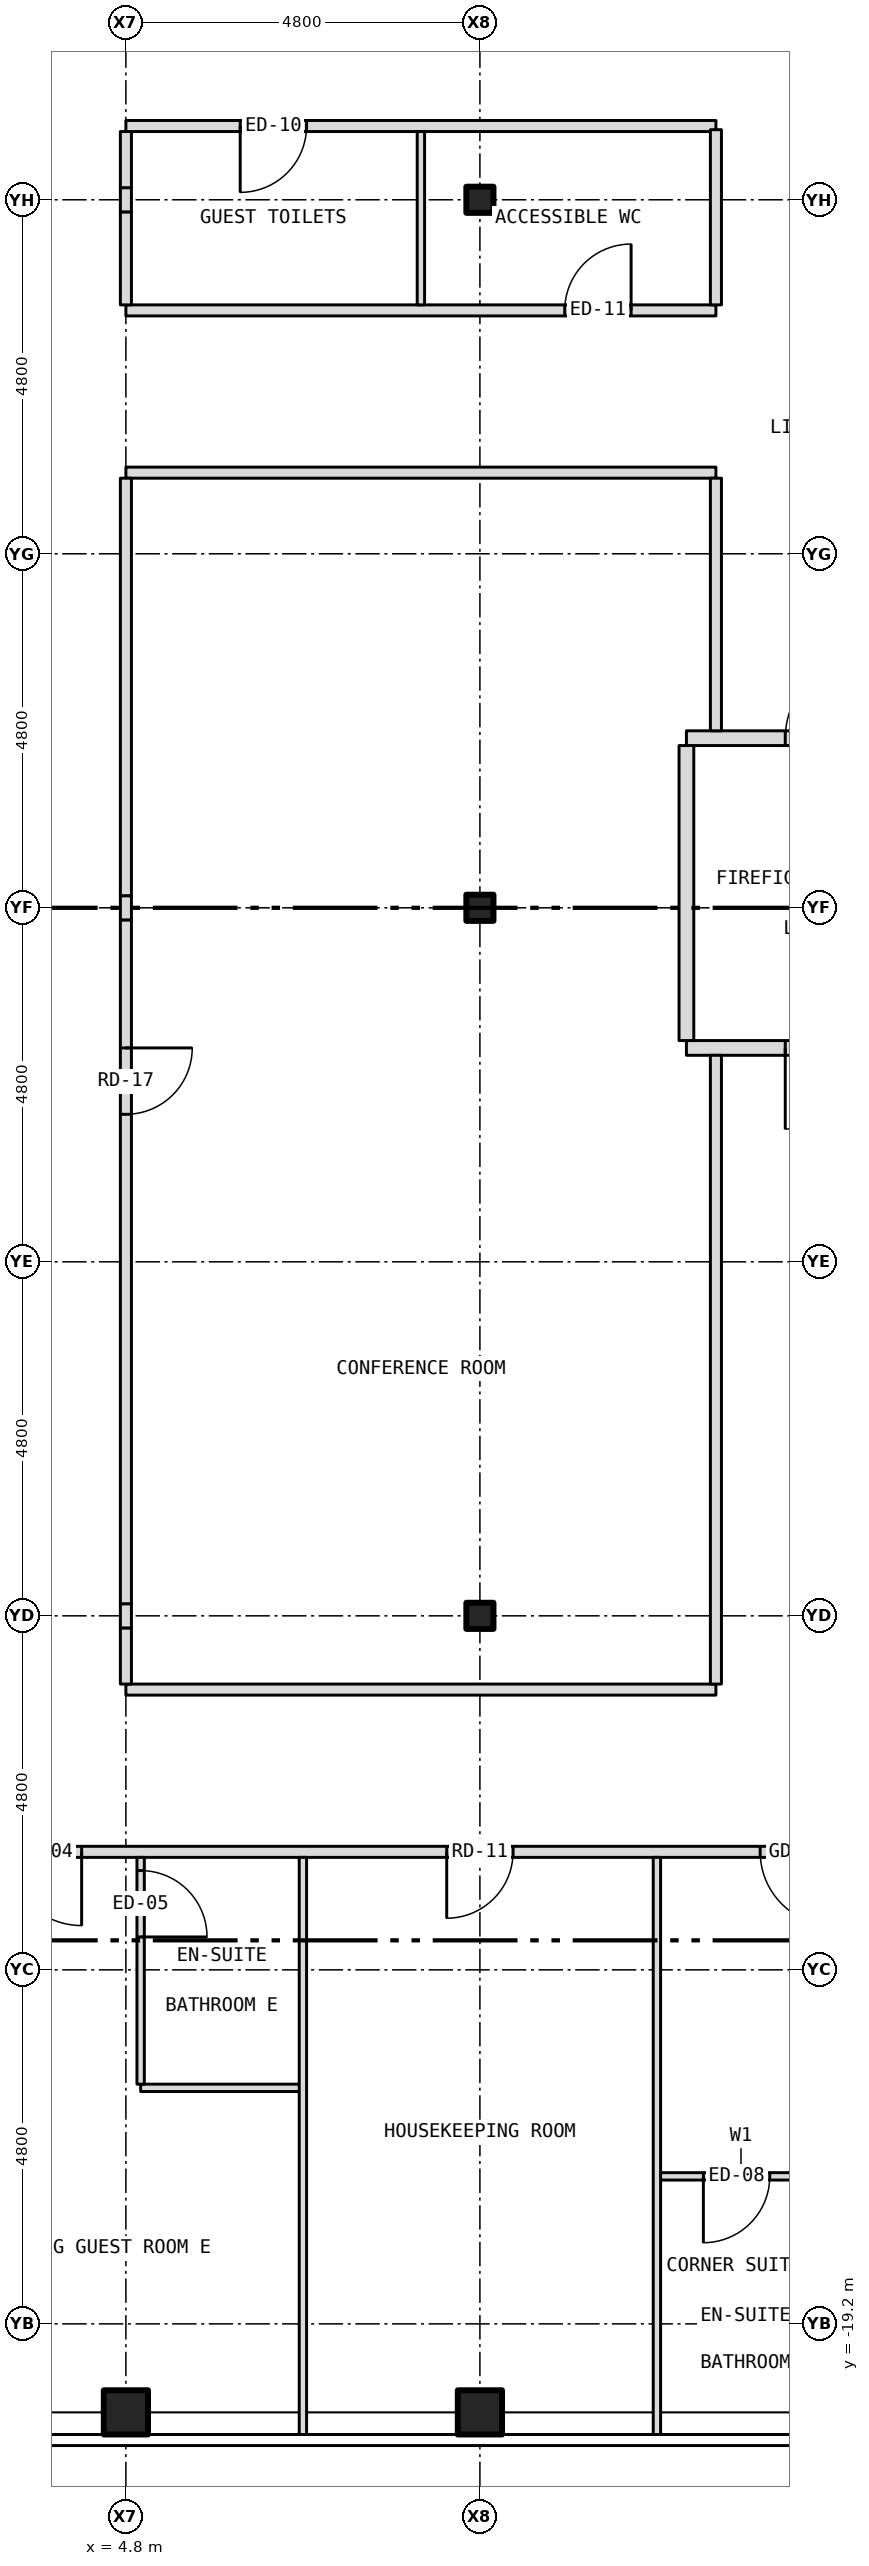
"""IFC4 building model, lengths in metres.
Left out: names, types, materials, properties, quantities, classifications, styles, units other than length and angle.
Written with IfcOpenShell. Run it as: python <this file> out.ifc"""

import sys

from ifc_helpers import new_model, si_unit, direction, frame, frame_2d, origin, origin_2d, place, context, subcontext, project, spatial, rectangle, hollow_rectangle, i_section, extrude, element, fill, save


model = new_model("IFC4")
c1 = context("Model", 3, precision=1e-05, world=origin(), true_north=direction((0.0, 1.0)))
c2 = subcontext(c1, "Body", "Model", "MODEL_VIEW")
j1 = project(units=[si_unit("LENGTHUNIT", "METRE"), si_unit("PLANEANGLEUNIT", "RADIAN")], contexts=[c1])
p1 = place(None, origin())
s1 = spatial("IfcSite", under=j1, at=p1, CompositionType="ELEMENT")
p2 = place(p1, origin())
s2 = spatial("IfcBuilding", under=s1, at=p2, CompositionType="ELEMENT")
p3 = place(p2, frame((0.0, 0.0, 251.5)))
s3 = spatial("IfcBuildingStorey", under=s2, at=p3, CompositionType="ELEMENT", Elevation=251.5)
for number, where, z_axis, x_axis in (
    (1, (4.8, -20.4, -0.15), (0.0, 0.0, 1.0), (1.0, 0.0, 0.0)),
    (2, (9.6, -20.4, -0.15), (0.0, 0.0, 1.0), (1.0, 0.0, 0.0)),
):
    element("IfcColumn", number, at=place(p3, frame(where, z_axis=z_axis, x_axis=x_axis)), inside=s3, PredefinedType="COLUMN", context=c2, shape_type="SweptSolid", body=[
        extrude(hollow_rectangle(XDim=0.6, YDim=0.6, WallThickness=0.03, at=origin_2d()), origin(), (0.0, 0.0, 1.0), 3.5),
    ])
for number, where, z_axis, x_axis in (
    (3, (9.6, -9.6, -0.15), (0.0, 0.0, 1.0), (1.0, 0.0, 0.0)),
    (4, (9.6, 0.0, -0.15), (0.0, 0.0, 1.0), (1.0, 0.0, 0.0)),
    (5, (9.6, 9.6, -0.15), (0.0, 0.0, 1.0), (1.0, 0.0, 0.0)),
):
    element("IfcColumn", number, at=place(p3, frame(where, z_axis=z_axis, x_axis=x_axis)), inside=s3, PredefinedType="COLUMN", context=c2, shape_type="SweptSolid", body=[
        extrude(i_section(OverallWidth=0.368, OverallDepth=0.356, WebThickness=0.011, FlangeThickness=0.018, at=origin_2d()), origin(), (0.0, 0.0, 1.0), 3.5),
    ])
p4 = place(p3, frame((12.0, -17.2, 0.0), z_axis=(0.0, 0.0, 1.0), x_axis=(1.0, 0.0, 0.0)))
e6 = element("IfcWall", 6, at=p4, inside=s3, PredefinedType="PARTITIONING", context=c2, shape_type="SweptSolid", body=[
    extrude(rectangle(XDim=2.28, YDim=0.1, at=frame_2d((1.14, 0.0))), origin(), (0.0, 0.0, 1.0), 3.35),
])
p5 = place(p4, frame((0.63, 0.0, 0.0)))
e7 = element("IfcOpeningElement", 7, at=p5, cuts=e6, PredefinedType="OPENING", context=c2, shape_type="SweptSolid", body=[
    extrude(rectangle(XDim=0.9, YDim=2.1, at=frame_2d((0.45, 1.05))), frame((0.0, 0.062, 0.0), z_axis=(0.0, -1.0, 0.0), x_axis=(1.0, 0.0, 0.0)), (0.0, 0.0, 1.0), 0.124),
])
p6 = place(p3, frame((5.0, -16.0, 0.0), z_axis=(0.0, 0.0, 1.0), x_axis=(1.0, 0.0, 0.0)))
e8 = element("IfcWall", 8, at=p6, inside=s3, PredefinedType="PARTITIONING", context=c2, shape_type="SweptSolid", body=[
    extrude(rectangle(XDim=2.2, YDim=0.1, at=frame_2d((1.1, 0.0))), origin(), (0.0, 0.0, 1.0), 3.35),
])
p7 = place(p3, frame((-15.8, -12.8, 0.0), z_axis=(0.0, 0.0, 1.0), x_axis=(1.0, 0.0, 0.0)))
e9 = element("IfcWall", 9, at=p7, inside=s3, PredefinedType="PARTITIONING", context=c2, shape_type="SweptSolid", body=[
    extrude(rectangle(XDim=31.6, YDim=0.15, at=frame_2d((15.8, 0.0))), origin(), (0.0, 0.0, 1.0), 3.35),
])
p8 = place(p7, frame((10.55, 0.0, 0.0)))
e10 = element("IfcOpeningElement", 10, at=p8, cuts=e9, PredefinedType="OPENING", context=c2, shape_type="SweptSolid", body=[
    extrude(rectangle(XDim=0.9, YDim=2.1, at=frame_2d((0.45, 1.05))), frame((0.0, 0.087, 0.0), z_axis=(0.0, -1.0, 0.0), x_axis=(1.0, 0.0, 0.0)), (0.0, 0.0, 1.0), 0.174),
])
p9 = place(p7, frame((19.0, 0.0, 0.0)))
e11 = element("IfcOpeningElement", 11, at=p9, cuts=e9, PredefinedType="OPENING", context=c2, shape_type="SweptSolid", body=[
    extrude(rectangle(XDim=1.0, YDim=2.1, at=frame_2d((0.5, 1.05))), frame((0.0, 0.087, 0.0), z_axis=(0.0, -1.0, 0.0), x_axis=(1.0, 0.0, 0.0)), (0.0, 0.0, 1.0), 0.174),
])
p10 = place(p7, frame((24.95, 0.0, 0.0)))
e12 = element("IfcOpeningElement", 12, at=p10, cuts=e9, PredefinedType="OPENING", context=c2, shape_type="SweptSolid", body=[
    extrude(rectangle(XDim=0.9, YDim=2.1, at=frame_2d((0.45, 1.05))), frame((0.0, 0.087, 0.0), z_axis=(0.0, -1.0, 0.0), x_axis=(1.0, 0.0, 0.0)), (0.0, 0.0, 1.0), 0.174),
])
p11 = place(p7, frame((1.4, 0.0, 0.0)))
e13 = element("IfcOpeningElement", 13, at=p11, cuts=e9, PredefinedType="OPENING", context=c2, shape_type="SweptSolid", body=[
    extrude(rectangle(XDim=1.0, YDim=2.1, at=frame_2d((0.5, 1.05))), frame((0.0, 0.087, 0.0), z_axis=(0.0, -1.0, 0.0), x_axis=(1.0, 0.0, 0.0)), (0.0, 0.0, 1.0), 0.174),
])
p12 = place(p7, frame((29.2, 0.0, 0.0)))
e14 = element("IfcOpeningElement", 14, at=p12, cuts=e9, PredefinedType="OPENING", context=c2, shape_type="SweptSolid", body=[
    extrude(rectangle(XDim=1.0, YDim=2.1, at=frame_2d((0.5, 1.05))), frame((0.0, 0.087, 0.0), z_axis=(0.0, -1.0, 0.0), x_axis=(1.0, 0.0, 0.0)), (0.0, 0.0, 1.0), 0.174),
])
p13 = place(p3, frame((4.8, -10.6, 0.0), z_axis=(0.0, 0.0, 1.0), x_axis=(1.0, 0.0, 0.0)))
e15 = element("IfcWall", 15, at=p13, inside=s3, PredefinedType="PARTITIONING", context=c2, shape_type="SweptSolid", body=[
    extrude(rectangle(XDim=8.0, YDim=0.15, at=frame_2d((4.0, 0.0))), origin(), (0.0, 0.0, 1.0), 3.35),
])
p14 = place(p3, frame((12.4, -1.9, 0.0), z_axis=(0.0, 0.0, 1.0), x_axis=(1.0, 0.0, 0.0)))
e16 = element("IfcWall", 16, at=p14, inside=s3, PredefinedType="PARTITIONING", context=c2, shape_type="SweptSolid", body=[
    extrude(rectangle(XDim=3.28, YDim=0.2, at=frame_2d((1.64, 0.0))), origin(), (0.0, 0.0, 1.0), 3.35),
])
p15 = place(p14, frame((1.34, 0.0, 0.0)))
e17 = element("IfcOpeningElement", 17, at=p15, cuts=e16, PredefinedType="OPENING", context=c2, shape_type="SweptSolid", body=[
    extrude(rectangle(XDim=1.1, YDim=2.1, at=frame_2d((0.55, 1.05))), frame((0.0, 0.112, 0.0), z_axis=(0.0, -1.0, 0.0), x_axis=(1.0, 0.0, 0.0)), (0.0, 0.0, 1.0), 0.224),
])
p16 = place(p3, frame((12.4, 2.3, 0.0), z_axis=(0.0, 0.0, 1.0), x_axis=(1.0, 0.0, 0.0)))
e18 = element("IfcWall", 18, at=p16, inside=s3, PredefinedType="PARTITIONING", context=c2, shape_type="SweptSolid", body=[
    extrude(rectangle(XDim=3.28, YDim=0.2, at=frame_2d((1.64, 0.0))), origin(), (0.0, 0.0, 1.0), 3.35),
])
p17 = place(p16, frame((1.34, 0.0, 0.0)))
e19 = element("IfcOpeningElement", 19, at=p17, cuts=e18, PredefinedType="OPENING", context=c2, shape_type="SweptSolid", body=[
    extrude(rectangle(XDim=1.1, YDim=2.1, at=frame_2d((0.55, 1.05))), frame((0.0, 0.112, 0.0), z_axis=(0.0, -1.0, 0.0), x_axis=(1.0, 0.0, 0.0)), (0.0, 0.0, 1.0), 0.224),
])
p18 = place(p3, frame((4.8, 5.9, 0.0), z_axis=(0.0, 0.0, 1.0), x_axis=(1.0, 0.0, 0.0)))
e20 = element("IfcWall", 20, at=p18, inside=s3, PredefinedType="PARTITIONING", context=c2, shape_type="SweptSolid", body=[
    extrude(rectangle(XDim=8.0, YDim=0.15, at=frame_2d((4.0, 0.0))), origin(), (0.0, 0.0, 1.0), 3.35),
])
p19 = place(p3, frame((4.8, 8.1, 0.0), z_axis=(0.0, 0.0, 1.0), x_axis=(1.0, 0.0, 0.0)))
e21 = element("IfcWall", 21, at=p19, inside=s3, PredefinedType="PARTITIONING", context=c2, shape_type="SweptSolid", body=[
    extrude(rectangle(XDim=8.0, YDim=0.15, at=frame_2d((4.0, 0.0))), origin(), (0.0, 0.0, 1.0), 3.35),
])
p20 = place(p19, frame((5.95, 0.0, 0.0)))
e22 = element("IfcOpeningElement", 22, at=p20, cuts=e21, PredefinedType="OPENING", context=c2, shape_type="SweptSolid", body=[
    extrude(rectangle(XDim=0.9, YDim=2.1, at=frame_2d((0.45, 1.05))), frame((0.0, 0.087, 0.0), z_axis=(0.0, -1.0, 0.0), x_axis=(1.0, 0.0, 0.0)), (0.0, 0.0, 1.0), 0.174),
])
p21 = place(p3, frame((4.8, 10.6, 0.0), z_axis=(0.0, 0.0, 1.0), x_axis=(1.0, 0.0, 0.0)))
e23 = element("IfcWall", 23, at=p21, inside=s3, PredefinedType="PARTITIONING", context=c2, shape_type="SweptSolid", body=[
    extrude(rectangle(XDim=8.0, YDim=0.15, at=frame_2d((4.0, 0.0))), origin(), (0.0, 0.0, 1.0), 3.35),
])
p22 = place(p21, frame((1.55, 0.0, 0.0)))
e24 = element("IfcOpeningElement", 24, at=p22, cuts=e23, PredefinedType="OPENING", context=c2, shape_type="SweptSolid", body=[
    extrude(rectangle(XDim=0.9, YDim=2.1, at=frame_2d((0.45, 1.05))), frame((0.0, 0.087, 0.0), z_axis=(0.0, -1.0, 0.0), x_axis=(1.0, 0.0, 0.0)), (0.0, 0.0, 1.0), 0.174),
])
p23 = place(p3, frame((4.8, -10.525, 0.0), z_axis=(0.0, 0.0, 1.0), x_axis=(0.0, 1.0, 0.0)))
e25 = element("IfcWall", 25, at=p23, inside=s3, PredefinedType="PARTITIONING", context=c2, shape_type="SweptSolid", body=[
    extrude(rectangle(XDim=0.761, YDim=0.15, at=frame_2d((0.38, 0.0))), origin(), (0.0, 0.0, 1.0), 2.817),
])
p24 = place(p3, frame((4.8, -9.764, 0.0), z_axis=(0.0, 0.0, 1.0), x_axis=(0.0, 1.0, 0.0)))
e26 = element("IfcWall", 26, at=p24, inside=s3, PredefinedType="PARTITIONING", context=c2, shape_type="SweptSolid", body=[
    extrude(rectangle(XDim=0.328, YDim=0.15, at=frame_2d((0.164, 0.0))), origin(), (0.0, 0.0, 1.0), 3.35),
])
p25 = place(p3, frame((4.8, -9.436, 0.0), z_axis=(0.0, 0.0, 1.0), x_axis=(0.0, 1.0, 0.0)))
e27 = element("IfcWall", 27, at=p25, inside=s3, PredefinedType="PARTITIONING", context=c2, shape_type="SweptSolid", body=[
    extrude(rectangle(XDim=9.272, YDim=0.15, at=frame_2d((4.636, 0.0))), origin(), (0.0, 0.0, 1.0), 2.817),
])
p26 = place(p25, frame((6.636, 0.0, 0.0)))
e28 = element("IfcOpeningElement", 28, at=p26, cuts=e27, PredefinedType="OPENING", context=c2, shape_type="SweptSolid", body=[
    extrude(rectangle(XDim=0.9, YDim=2.1, at=frame_2d((0.45, 1.05))), frame((0.0, 0.087, 0.0), z_axis=(0.0, -1.0, 0.0), x_axis=(1.0, 0.0, 0.0)), (0.0, 0.0, 1.0), 0.174),
])
p27 = place(p3, frame((4.8, -0.164, 0.0), z_axis=(0.0, 0.0, 1.0), x_axis=(0.0, 1.0, 0.0)))
e29 = element("IfcWall", 29, at=p27, inside=s3, PredefinedType="PARTITIONING", context=c2, shape_type="SweptSolid", body=[
    extrude(rectangle(XDim=0.328, YDim=0.15, at=frame_2d((0.164, 0.0))), origin(), (0.0, 0.0, 1.0), 3.35),
])
p28 = place(p3, frame((4.8, 0.164, 0.0), z_axis=(0.0, 0.0, 1.0), x_axis=(0.0, 1.0, 0.0)))
e30 = element("IfcWall", 30, at=p28, inside=s3, PredefinedType="PARTITIONING", context=c2, shape_type="SweptSolid", body=[
    extrude(rectangle(XDim=5.661, YDim=0.15, at=frame_2d((2.831, 0.0))), origin(), (0.0, 0.0, 1.0), 2.817),
])
p29 = place(p3, frame((4.8, 8.175, 0.0), z_axis=(0.0, 0.0, 1.0), x_axis=(0.0, 1.0, 0.0)))
e31 = element("IfcWall", 31, at=p29, inside=s3, PredefinedType="PARTITIONING", context=c2, shape_type="SweptSolid", body=[
    extrude(rectangle(XDim=1.261, YDim=0.15, at=frame_2d((0.63, 0.0))), origin(), (0.0, 0.0, 1.0), 2.817),
])
p30 = place(p3, frame((4.8, 9.436, 0.0), z_axis=(0.0, 0.0, 1.0), x_axis=(0.0, 1.0, 0.0)))
e32 = element("IfcWall", 32, at=p30, inside=s3, PredefinedType="PARTITIONING", context=c2, shape_type="SweptSolid", body=[
    extrude(rectangle(XDim=0.328, YDim=0.15, at=frame_2d((0.164, 0.0))), origin(), (0.0, 0.0, 1.0), 3.35),
])
p31 = place(p3, frame((4.8, 9.764, 0.0), z_axis=(0.0, 0.0, 1.0), x_axis=(0.0, 1.0, 0.0)))
e33 = element("IfcWall", 33, at=p31, inside=s3, PredefinedType="PARTITIONING", context=c2, shape_type="SweptSolid", body=[
    extrude(rectangle(XDim=0.761, YDim=0.15, at=frame_2d((0.38, 0.0))), origin(), (0.0, 0.0, 1.0), 2.817),
])
p32 = place(p3, frame((5.0, -15.95, 0.0), z_axis=(0.0, 0.0, 1.0), x_axis=(0.0, 1.0, 0.0)))
e34 = element("IfcWall", 34, at=p32, inside=s3, PredefinedType="PARTITIONING", context=c2, shape_type="SweptSolid", body=[
    extrude(rectangle(XDim=3.075, YDim=0.1, at=frame_2d((1.538, 0.0))), origin(), (0.0, 0.0, 1.0), 3.35),
])
p33 = place(p32, frame((1.996, 0.0, 0.0)))
e35 = element("IfcOpeningElement", 35, at=p33, cuts=e34, PredefinedType="OPENING", context=c2, shape_type="SweptSolid", body=[
    extrude(rectangle(XDim=0.9, YDim=2.1, at=frame_2d((0.45, 1.05))), frame((0.0, 0.062, 0.0), z_axis=(0.0, -1.0, 0.0), x_axis=(1.0, 0.0, 0.0)), (0.0, 0.0, 1.0), 0.124),
])
p34 = place(p3, frame((7.2, -20.73, 0.0), z_axis=(0.0, 0.0, 1.0), x_axis=(0.0, 1.0, 0.0)))
e36 = element("IfcWall", 36, at=p34, inside=s3, PredefinedType="PARTITIONING", context=c2, shape_type="SweptSolid", body=[
    extrude(rectangle(XDim=7.855, YDim=0.1, at=frame_2d((3.927, 0.0))), origin(), (0.0, 0.0, 1.0), 3.35),
])
p35 = place(p3, frame((8.8, 8.175, 0.0), z_axis=(0.0, 0.0, 1.0), x_axis=(0.0, 1.0, 0.0)))
e37 = element("IfcWall", 37, at=p35, inside=s3, PredefinedType="PARTITIONING", context=c2, shape_type="SweptSolid", body=[
    extrude(rectangle(XDim=2.35, YDim=0.1, at=frame_2d((1.175, 0.0))), origin(), (0.0, 0.0, 1.0), 3.35),
])
p36 = place(p3, frame((12.0, -20.73, 0.0), z_axis=(0.0, 0.0, 1.0), x_axis=(0.0, 1.0, 0.0)))
e38 = element("IfcWall", 38, at=p36, inside=s3, PredefinedType="PARTITIONING", context=c2, shape_type="SweptSolid", body=[
    extrude(rectangle(XDim=7.855, YDim=0.1, at=frame_2d((3.927, 0.0))), origin(), (0.0, 0.0, 1.0), 3.35),
])
p37 = place(p3, frame((12.4, -1.8, 0.0), z_axis=(0.0, 0.0, 1.0), x_axis=(0.0, 1.0, 0.0)))
e39 = element("IfcWall", 39, at=p37, inside=s3, PredefinedType="PARTITIONING", context=c2, shape_type="SweptSolid", body=[
    extrude(rectangle(XDim=4.0, YDim=0.2, at=frame_2d((2.0, 0.0))), origin(), (0.0, 0.0, 1.0), 3.35),
])
p38 = place(p3, frame((12.8, -10.525, 0.0), z_axis=(0.0, 0.0, 1.0), x_axis=(0.0, 1.0, 0.0)))
e40 = element("IfcWall", 40, at=p38, inside=s3, PredefinedType="PARTITIONING", context=c2, shape_type="SweptSolid", body=[
    extrude(rectangle(XDim=8.525, YDim=0.15, at=frame_2d((4.262, 0.0))), origin(), (0.0, 0.0, 1.0), 3.35),
])
p39 = place(p3, frame((12.8, 2.4, 0.0), z_axis=(0.0, 0.0, 1.0), x_axis=(0.0, 1.0, 0.0)))
e41 = element("IfcWall", 41, at=p39, inside=s3, PredefinedType="PARTITIONING", context=c2, shape_type="SweptSolid", body=[
    extrude(rectangle(XDim=3.425, YDim=0.15, at=frame_2d((1.712, 0.0))), origin(), (0.0, 0.0, 1.0), 3.35),
])
p40 = place(p3, frame((12.8, 8.175, 0.0), z_axis=(0.0, 0.0, 1.0), x_axis=(0.0, 1.0, 0.0)))
e42 = element("IfcWall", 42, at=p40, inside=s3, PredefinedType="PARTITIONING", context=c2, shape_type="SweptSolid", body=[
    extrude(rectangle(XDim=2.375, YDim=0.15, at=frame_2d((1.188, 0.0))), origin(), (0.0, 0.0, 1.0), 3.35),
])
p41 = place(p17, origin())
e43 = element("IfcDoor", 43, at=p41, inside=s3, OperationType="SINGLE_SWING_RIGHT", PredefinedType="DOOR", context=c2, shape_type="SweptSolid", body=[
    extrude(rectangle(XDim=1.1, YDim=2.1, at=frame_2d((0.55, 1.05))), frame((0.0, 0.025, 0.0), z_axis=(0.0, -1.0, 0.0), x_axis=(1.0, 0.0, 0.0)), (0.0, 0.0, 1.0), 0.05),
])
fill(e19, e43)
p42 = place(p15, origin())
e44 = element("IfcDoor", 44, at=p42, inside=s3, OperationType="SINGLE_SWING_LEFT", PredefinedType="DOOR", context=c2, shape_type="SweptSolid", body=[
    extrude(rectangle(XDim=1.1, YDim=2.1, at=frame_2d((0.55, 1.05))), frame((0.0, 0.025, 0.0), z_axis=(0.0, -1.0, 0.0), x_axis=(1.0, 0.0, 0.0)), (0.0, 0.0, 1.0), 0.05),
])
fill(e17, e44)
p43 = place(p9, origin())
e45 = element("IfcDoor", 45, at=p43, inside=s3, OperationType="SINGLE_SWING_RIGHT", PredefinedType="DOOR", context=c2, shape_type="SweptSolid", body=[
    extrude(rectangle(XDim=1.0, YDim=2.1, at=frame_2d((0.5, 1.05))), frame((0.0, 0.025, 0.0), z_axis=(0.0, -1.0, 0.0), x_axis=(1.0, 0.0, 0.0)), (0.0, 0.0, 1.0), 0.05),
])
fill(e11, e45)
p44 = place(p33, origin())
e46 = element("IfcDoor", 46, at=p44, inside=s3, OperationType="SINGLE_SWING_LEFT", PredefinedType="DOOR", context=c2, shape_type="SweptSolid", body=[
    extrude(rectangle(XDim=0.9, YDim=2.1, at=frame_2d((0.45, 1.05))), frame((0.0, 0.025, 0.0), z_axis=(0.0, -1.0, 0.0), x_axis=(1.0, 0.0, 0.0)), (0.0, 0.0, 1.0), 0.05),
])
fill(e35, e46)
p45 = place(p10, origin())
e47 = element("IfcDoor", 47, at=p45, inside=s3, OperationType="SINGLE_SWING_LEFT", PredefinedType="DOOR", context=c2, shape_type="SweptSolid", body=[
    extrude(rectangle(XDim=0.9, YDim=2.1, at=frame_2d((0.45, 1.05))), frame((0.0, 0.025, 0.0), z_axis=(0.0, -1.0, 0.0), x_axis=(1.0, 0.0, 0.0)), (0.0, 0.0, 1.0), 0.05),
])
fill(e12, e47)
p46 = place(p5, origin())
e48 = element("IfcDoor", 48, at=p46, inside=s3, OperationType="SINGLE_SWING_LEFT", PredefinedType="DOOR", context=c2, shape_type="SweptSolid", body=[
    extrude(rectangle(XDim=0.9, YDim=2.1, at=frame_2d((0.45, 1.05))), frame((0.0, 0.025, 0.0), z_axis=(0.0, -1.0, 0.0), x_axis=(1.0, 0.0, 0.0)), (0.0, 0.0, 1.0), 0.05),
])
fill(e7, e48)
p47 = place(p12, origin())
e49 = element("IfcDoor", 49, at=p47, inside=s3, OperationType="SINGLE_SWING_RIGHT", PredefinedType="DOOR", context=c2, shape_type="SweptSolid", body=[
    extrude(rectangle(XDim=1.0, YDim=2.1, at=frame_2d((0.5, 1.05))), frame((0.0, 0.025, 0.0), z_axis=(0.0, -1.0, 0.0), x_axis=(1.0, 0.0, 0.0)), (0.0, 0.0, 1.0), 0.05),
])
fill(e14, e49)
p48 = place(p22, origin())
e50 = element("IfcDoor", 50, at=p48, inside=s3, OperationType="SINGLE_SWING_LEFT", PredefinedType="DOOR", context=c2, shape_type="SweptSolid", body=[
    extrude(rectangle(XDim=0.9, YDim=2.1, at=frame_2d((0.45, 1.05))), frame((0.0, 0.025, 0.0), z_axis=(0.0, -1.0, 0.0), x_axis=(1.0, 0.0, 0.0)), (0.0, 0.0, 1.0), 0.05),
])
fill(e24, e50)
p49 = place(p20, origin())
e51 = element("IfcDoor", 51, at=p49, inside=s3, OperationType="SINGLE_SWING_RIGHT", PredefinedType="DOOR", context=c2, shape_type="SweptSolid", body=[
    extrude(rectangle(XDim=0.9, YDim=2.1, at=frame_2d((0.45, 1.05))), frame((0.0, 0.025, 0.0), z_axis=(0.0, -1.0, 0.0), x_axis=(1.0, 0.0, 0.0)), (0.0, 0.0, 1.0), 0.05),
])
fill(e22, e51)
p50 = place(p26, origin())
e52 = element("IfcDoor", 52, at=p50, inside=s3, OperationType="SINGLE_SWING_RIGHT", PredefinedType="DOOR", context=c2, shape_type="SweptSolid", body=[
    extrude(rectangle(XDim=0.9, YDim=2.1, at=frame_2d((0.45, 1.05))), frame((0.0, 0.025, 0.0), z_axis=(0.0, -1.0, 0.0), x_axis=(1.0, 0.0, 0.0)), (0.0, 0.0, 1.0), 0.05),
])
fill(e28, e52)
save(model, sys.argv[1])
